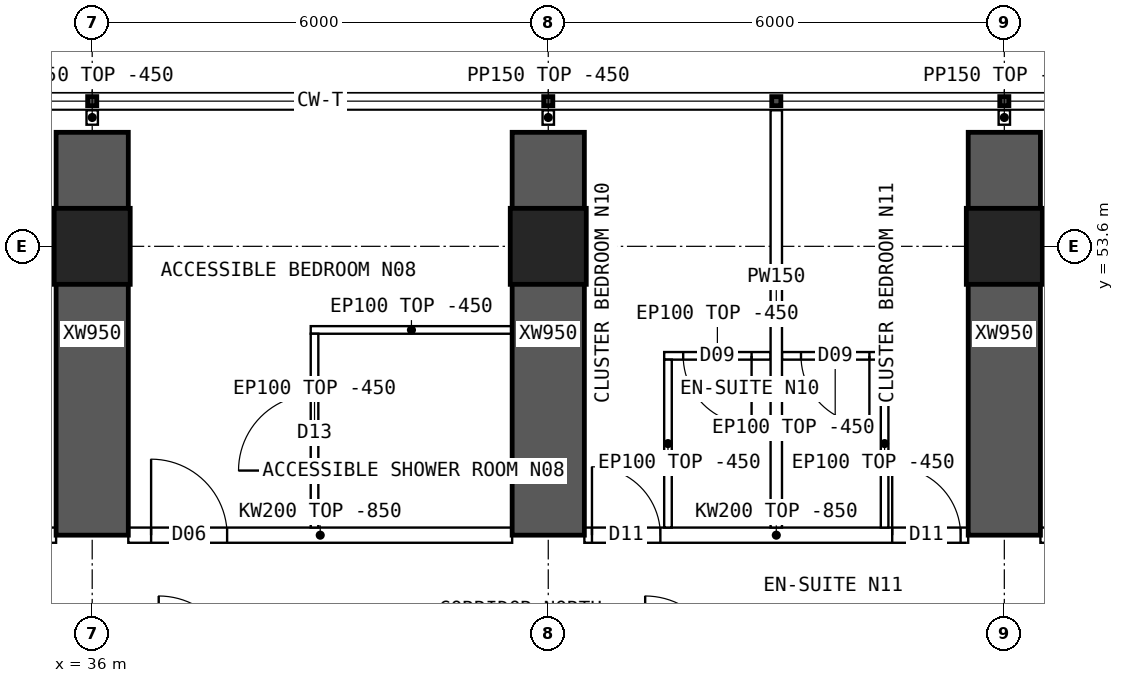
"""IFC4 building model, lengths in metres.
Left out: names, types, materials, properties, quantities, classifications, styles, units other than length and angle.
Written with IfcOpenShell. Run it as: python <this file> out.ifc"""

import sys

from ifc_helpers import new_model, si_unit, direction, frame, frame_2d, origin, origin_2d, place, context, subcontext, project, spatial, polyline, rectangle, hollow_rectangle, outline, extrude, element, fill, save


model = new_model("IFC4")
c1 = context("Model", 3, precision=1e-05, world=origin(), true_north=direction((0.0, 1.0)))
c2 = subcontext(c1, "Body", "Model", "MODEL_VIEW")
j1 = project(units=[si_unit("LENGTHUNIT", "METRE"), si_unit("PLANEANGLEUNIT", "RADIAN")], contexts=[c1])
p1 = place(None, origin())
s1 = spatial("IfcSite", under=j1, at=p1, CompositionType="ELEMENT")
p2 = place(p1, origin())
s2 = spatial("IfcBuilding", under=s1, at=p2, CompositionType="ELEMENT")
p3 = place(p2, frame((0.0, 0.0, 95.65)))
s3 = spatial("IfcBuildingStorey", under=s2, at=p3, CompositionType="ELEMENT", Elevation=95.65)
for number, where, z_axis, x_axis in (
    (1, (36.0, 53.6, 0.0), (0.0, 0.0, 1.0), (1.0, 0.0, 0.0)),
    (2, (42.0, 53.6, 0.0), (0.0, 0.0, 1.0), (1.0, 0.0, 0.0)),
    (3, (48.0, 53.6, 0.0), (0.0, 0.0, 1.0), (1.0, 0.0, 0.0)),
):
    element("IfcColumn", number, at=place(p3, frame(where, z_axis=z_axis, x_axis=x_axis)), inside=s3, PredefinedType="COLUMN", context=c2, shape_type="SweptSolid", body=[
        extrude(hollow_rectangle(XDim=1.0, YDim=1.0, WallThickness=0.1, at=origin_2d()), origin(), (0.0, 0.0, 1.0), 3.75),
    ])
for number, where, z_axis, x_axis in (
    (4, (36.0, 49.8, 0.0), (0.0, 0.0, 1.0), (0.0, 1.0, 0.0)),
    (5, (42.0, 49.8, 0.0), (0.0, 0.0, 1.0), (0.0, 1.0, 0.0)),
    (6, (48.0, 49.8, 0.0), (0.0, 0.0, 1.0), (0.0, 1.0, 0.0)),
):
    element("IfcWall", number, at=place(p3, frame(where, z_axis=z_axis, x_axis=x_axis)), inside=s3, PredefinedType="SHEAR", context=c2, shape_type="SweptSolid", body=[
        extrude(rectangle(XDim=5.3, YDim=0.95, at=frame_2d((2.65, 0.0))), origin(), (0.0, 0.0, 1.0), 3.75),
    ])
p4 = place(p3, frame((30.475, 49.8, 0.0), z_axis=(0.0, 0.0, 1.0), x_axis=(1.0, 0.0, 0.0)))
e7 = element("IfcWall", 7, at=p4, inside=s3, PredefinedType="SOLIDWALL", context=c2, shape_type="SweptSolid", body=[
    extrude(outline(polyline([(0.0, 0.0), (5.05, 0.0), (5.05, 2.9), (0.0, 2.9), (0.0, 0.0)])), frame((0.0, 0.1, 0.0), z_axis=(0.0, -1.0, 0.0), x_axis=(1.0, 0.0, 0.0)), (0.0, 0.0, 1.0), 0.2),
])
p5 = place(p4, frame((0.1, 0.0, 0.0)))
e8 = element("IfcOpeningElement", 8, at=p5, cuts=e7, PredefinedType="OPENING", context=c2, shape_type="SweptSolid", body=[
    extrude(rectangle(XDim=0.9, YDim=2.1, at=frame_2d((0.45, 1.05))), frame((0.0, 0.11, 0.0), z_axis=(0.0, -1.0, 0.0), x_axis=(1.0, 0.0, 0.0)), (0.0, 0.0, 1.0), 0.22),
])
p6 = place(p4, frame((4.05, 0.0, 0.0)))
e9 = element("IfcOpeningElement", 9, at=p6, cuts=e7, PredefinedType="OPENING", context=c2, shape_type="SweptSolid", body=[
    extrude(rectangle(XDim=0.9, YDim=2.1, at=frame_2d((0.45, 1.05))), frame((0.0, 0.11, 0.0), z_axis=(0.0, -1.0, 0.0), x_axis=(1.0, 0.0, 0.0)), (0.0, 0.0, 1.0), 0.22),
])
p7 = place(p3, frame((36.475, 49.8, 0.0), z_axis=(0.0, 0.0, 1.0), x_axis=(1.0, 0.0, 0.0)))
e10 = element("IfcWall", 10, at=p7, inside=s3, PredefinedType="SOLIDWALL", context=c2, shape_type="SweptSolid", body=[
    extrude(outline(polyline([(0.0, 0.0), (5.05, 0.0), (5.05, 2.9), (0.0, 2.9), (0.0, 0.0)])), frame((0.0, 0.1, 0.0), z_axis=(0.0, -1.0, 0.0), x_axis=(1.0, 0.0, 0.0)), (0.0, 0.0, 1.0), 0.2),
])
p8 = place(p7, frame((0.3, 0.0, 0.0)))
e11 = element("IfcOpeningElement", 11, at=p8, cuts=e10, PredefinedType="OPENING", context=c2, shape_type="SweptSolid", body=[
    extrude(rectangle(XDim=1.0, YDim=2.1, at=frame_2d((0.5, 1.05))), frame((0.0, 0.11, 0.0), z_axis=(0.0, -1.0, 0.0), x_axis=(1.0, 0.0, 0.0)), (0.0, 0.0, 1.0), 0.22),
])
p9 = place(p3, frame((42.475, 49.8, 0.0), z_axis=(0.0, 0.0, 1.0), x_axis=(1.0, 0.0, 0.0)))
e12 = element("IfcWall", 12, at=p9, inside=s3, PredefinedType="SOLIDWALL", context=c2, shape_type="SweptSolid", body=[
    extrude(outline(polyline([(0.0, 0.0), (5.05, 0.0), (5.05, 2.9), (0.0, 2.9), (0.0, 0.0)])), frame((0.0, 0.1, 0.0), z_axis=(0.0, -1.0, 0.0), x_axis=(1.0, 0.0, 0.0)), (0.0, 0.0, 1.0), 0.2),
])
p10 = place(p9, frame((0.1, 0.0, 0.0)))
e13 = element("IfcOpeningElement", 13, at=p10, cuts=e12, PredefinedType="OPENING", context=c2, shape_type="SweptSolid", body=[
    extrude(rectangle(XDim=0.9, YDim=2.1, at=frame_2d((0.45, 1.05))), frame((0.0, 0.11, 0.0), z_axis=(0.0, -1.0, 0.0), x_axis=(1.0, 0.0, 0.0)), (0.0, 0.0, 1.0), 0.22),
])
p11 = place(p9, frame((4.05, 0.0, 0.0)))
e14 = element("IfcOpeningElement", 14, at=p11, cuts=e12, PredefinedType="OPENING", context=c2, shape_type="SweptSolid", body=[
    extrude(rectangle(XDim=0.9, YDim=2.1, at=frame_2d((0.45, 1.05))), frame((0.0, 0.11, 0.0), z_axis=(0.0, -1.0, 0.0), x_axis=(1.0, 0.0, 0.0)), (0.0, 0.0, 1.0), 0.22),
])
p12 = place(p3, frame((48.475, 49.8, 0.0), z_axis=(0.0, 0.0, 1.0), x_axis=(1.0, 0.0, 0.0)))
e15 = element("IfcWall", 15, at=p12, inside=s3, PredefinedType="SOLIDWALL", context=c2, shape_type="SweptSolid", body=[
    extrude(outline(polyline([(0.0, 0.0), (5.05, 0.0), (5.05, 2.9), (0.0, 2.9), (0.0, 0.0)])), frame((0.0, 0.1, 0.0), z_axis=(0.0, -1.0, 0.0), x_axis=(1.0, 0.0, 0.0)), (0.0, 0.0, 1.0), 0.2),
])
p13 = place(p12, frame((0.6, 0.0, 0.0)))
e16 = element("IfcOpeningElement", 16, at=p13, cuts=e15, PredefinedType="OPENING", context=c2, shape_type="SweptSolid", body=[
    extrude(rectangle(XDim=1.0, YDim=2.1, at=frame_2d((0.5, 1.05))), frame((0.0, 0.11, 0.0), z_axis=(0.0, -1.0, 0.0), x_axis=(1.0, 0.0, 0.0)), (0.0, 0.0, 1.0), 0.22),
])
p14 = place(p3, frame((38.875, 52.5, 0.0), z_axis=(0.0, 0.0, 1.0), x_axis=(1.0, 0.0, 0.0)))
e17 = element("IfcWall", 17, at=p14, inside=s3, PredefinedType="PARTITIONING", context=c2, shape_type="SweptSolid", body=[
    extrude(rectangle(XDim=2.65, YDim=0.1, at=frame_2d((1.325, 0.0))), origin(), (0.0, 0.0, 1.0), 3.3),
])
p15 = place(p3, frame((38.925, 52.45, 0.0), z_axis=(0.0, 0.0, 1.0), x_axis=(0.0, -1.0, 0.0)))
e18 = element("IfcWall", 18, at=p15, inside=s3, PredefinedType="PARTITIONING", context=c2, shape_type="SweptSolid", body=[
    extrude(outline(polyline([(0.0, 0.0), (2.55, 0.0), (2.55, 2.9), (2.502, 2.9), (2.5, 3.3), (0.0, 3.3), (0.0, 0.0)])), frame((0.0, 0.05, 0.0), z_axis=(0.0, -1.0, 0.0), x_axis=(1.0, 0.0, 0.0)), (0.0, 0.0, 1.0), 0.1),
])
p16 = place(p15, frame((0.8, 0.0, 0.0)))
e19 = element("IfcOpeningElement", 19, at=p16, cuts=e18, PredefinedType="OPENING", context=c2, shape_type="SweptSolid", body=[
    extrude(rectangle(XDim=1.0, YDim=2.1, at=frame_2d((0.5, 1.05))), frame((0.0, 0.06, 0.0), z_axis=(0.0, -1.0, 0.0), x_axis=(1.0, 0.0, 0.0)), (0.0, 0.0, 1.0), 0.12),
])
p17 = place(p3, frame((45.0, 55.39, 0.0), z_axis=(0.0, 0.0, 1.0), x_axis=(0.0, -1.0, 0.0)))
e20 = element("IfcWall", 20, at=p17, inside=s3, PredefinedType="PARTITIONING", context=c2, shape_type="SweptSolid", body=[
    extrude(outline(polyline([(0.0, 0.0), (5.49, 0.0), (5.49, 2.9), (5.442, 2.9), (5.44, 3.3), (1.992, 3.3), (1.99, 2.9), (1.592, 2.9), (1.59, 3.3), (0.0, 3.3), (0.0, 0.0)])), frame((0.0, 0.075, 0.0), z_axis=(0.0, -1.0, 0.0), x_axis=(1.0, 0.0, 0.0)), (0.0, 0.0, 1.0), 0.15),
])
p18 = place(p3, frame((43.525, 52.159, 0.0), z_axis=(0.0, 0.0, 1.0), x_axis=(1.0, 0.0, 0.0)))
e21 = element("IfcWall", 21, at=p18, inside=s3, PredefinedType="PARTITIONING", context=c2, shape_type="SweptSolid", body=[
    extrude(rectangle(XDim=1.4, YDim=0.1, at=frame_2d((0.7, 0.0))), origin(), (0.0, 0.0, 1.0), 3.3),
])
p19 = place(p18, frame((0.25, 0.0, 0.0)))
e22 = element("IfcOpeningElement", 22, at=p19, cuts=e21, PredefinedType="OPENING", context=c2, shape_type="SweptSolid", body=[
    extrude(rectangle(XDim=0.9, YDim=2.1, at=frame_2d((0.45, 1.05))), frame((0.0, 0.06, 0.0), z_axis=(0.0, -1.0, 0.0), x_axis=(1.0, 0.0, 0.0)), (0.0, 0.0, 1.0), 0.12),
])
p20 = place(p3, frame((43.575, 52.109, 0.0), z_axis=(0.0, 0.0, 1.0), x_axis=(0.0, -1.0, 0.0)))
e23 = element("IfcWall", 23, at=p20, inside=s3, PredefinedType="PARTITIONING", context=c2, shape_type="SweptSolid", body=[
    extrude(outline(polyline([(0.0, 0.0), (2.209, 0.0), (2.209, 2.9), (2.161, 2.9), (2.159, 3.3), (0.0, 3.3), (0.0, 0.0)])), frame((0.0, 0.05, 0.0), z_axis=(0.0, -1.0, 0.0), x_axis=(1.0, 0.0, 0.0)), (0.0, 0.0, 1.0), 0.1),
])
p21 = place(p3, frame((45.075, 52.159, 0.0), z_axis=(0.0, 0.0, 1.0), x_axis=(1.0, 0.0, 0.0)))
e24 = element("IfcWall", 24, at=p21, inside=s3, PredefinedType="PARTITIONING", context=c2, shape_type="SweptSolid", body=[
    extrude(rectangle(XDim=1.4, YDim=0.1, at=frame_2d((0.7, 0.0))), origin(), (0.0, 0.0, 1.0), 3.3),
])
p22 = place(p21, frame((0.25, 0.0, 0.0)))
e25 = element("IfcOpeningElement", 25, at=p22, cuts=e24, PredefinedType="OPENING", context=c2, shape_type="SweptSolid", body=[
    extrude(rectangle(XDim=0.9, YDim=2.1, at=frame_2d((0.45, 1.05))), frame((0.0, 0.06, 0.0), z_axis=(0.0, -1.0, 0.0), x_axis=(1.0, 0.0, 0.0)), (0.0, 0.0, 1.0), 0.12),
])
p23 = place(p3, frame((46.425, 52.109, 0.0), z_axis=(0.0, 0.0, 1.0), x_axis=(0.0, -1.0, 0.0)))
e26 = element("IfcWall", 26, at=p23, inside=s3, PredefinedType="PARTITIONING", context=c2, shape_type="SweptSolid", body=[
    extrude(outline(polyline([(0.0, 0.0), (2.209, 0.0), (2.209, 2.9), (2.161, 2.9), (2.159, 3.3), (0.0, 3.3), (0.0, 0.0)])), frame((0.0, 0.05, 0.0), z_axis=(0.0, -1.0, 0.0), x_axis=(1.0, 0.0, 0.0)), (0.0, 0.0, 1.0), 0.1),
])
for number, where, z_axis, x_axis in (
    (27, (36.0, 55.2, 0.0), (0.0, 0.0, 1.0), (0.0, 1.0, 0.0)),
    (28, (42.0, 55.2, 0.0), (0.0, 0.0, 1.0), (0.0, 1.0, 0.0)),
    (29, (48.0, 55.2, 0.0), (0.0, 0.0, 1.0), (0.0, 1.0, 0.0)),
):
    element("IfcWall", number, at=place(p3, frame(where, z_axis=z_axis, x_axis=x_axis)), inside=s3, PredefinedType="PARTITIONING", context=c2, shape_type="SweptSolid", body=[
        extrude(rectangle(XDim=0.19, YDim=0.15, at=frame_2d((0.095, 0.0))), origin(), (0.0, 0.0, 1.0), 3.3),
    ])
p24 = place(p16, origin())
e30 = element("IfcDoor", 30, at=p24, inside=s3, OperationType="SINGLE_SWING_RIGHT", PredefinedType="DOOR", context=c2, shape_type="SweptSolid", body=[
    extrude(rectangle(XDim=1.0, YDim=2.1, at=frame_2d((0.5, 1.05))), frame((0.0, 0.025, 0.0), z_axis=(0.0, -1.0, 0.0), x_axis=(1.0, 0.0, 0.0)), (0.0, 0.0, 1.0), 0.05),
])
fill(e19, e30)
p25 = place(p8, origin())
e31 = element("IfcDoor", 31, at=p25, inside=s3, OperationType="SINGLE_SWING_LEFT", PredefinedType="DOOR", context=c2, shape_type="SweptSolid", body=[
    extrude(rectangle(XDim=1.0, YDim=2.1, at=frame_2d((0.5, 1.05))), frame((0.0, 0.025, 0.0), z_axis=(0.0, -1.0, 0.0), x_axis=(1.0, 0.0, 0.0)), (0.0, 0.0, 1.0), 0.05),
])
fill(e11, e31)
p26 = place(p19, origin())
e32 = element("IfcDoor", 32, at=p26, inside=s3, OperationType="SINGLE_SWING_RIGHT", PredefinedType="DOOR", context=c2, shape_type="SweptSolid", body=[
    extrude(rectangle(XDim=0.9, YDim=2.1, at=frame_2d((0.45, 1.05))), frame((0.0, 0.025, 0.0), z_axis=(0.0, -1.0, 0.0), x_axis=(1.0, 0.0, 0.0)), (0.0, 0.0, 1.0), 0.05),
])
fill(e22, e32)
p27 = place(p10, origin())
e33 = element("IfcDoor", 33, at=p27, inside=s3, OperationType="SINGLE_SWING_LEFT", PredefinedType="DOOR", context=c2, shape_type="SweptSolid", body=[
    extrude(rectangle(XDim=0.9, YDim=2.1, at=frame_2d((0.45, 1.05))), frame((0.0, 0.025, 0.0), z_axis=(0.0, -1.0, 0.0), x_axis=(1.0, 0.0, 0.0)), (0.0, 0.0, 1.0), 0.05),
])
fill(e13, e33)
p28 = place(p22, origin())
e34 = element("IfcDoor", 34, at=p28, inside=s3, OperationType="SINGLE_SWING_RIGHT", PredefinedType="DOOR", context=c2, shape_type="SweptSolid", body=[
    extrude(rectangle(XDim=0.9, YDim=2.1, at=frame_2d((0.45, 1.05))), frame((0.0, 0.025, 0.0), z_axis=(0.0, -1.0, 0.0), x_axis=(1.0, 0.0, 0.0)), (0.0, 0.0, 1.0), 0.05),
])
fill(e25, e34)
p29 = place(p11, origin())
e35 = element("IfcDoor", 35, at=p29, inside=s3, OperationType="SINGLE_SWING_LEFT", PredefinedType="DOOR", context=c2, shape_type="SweptSolid", body=[
    extrude(rectangle(XDim=0.9, YDim=2.1, at=frame_2d((0.45, 1.05))), frame((0.0, 0.025, 0.0), z_axis=(0.0, -1.0, 0.0), x_axis=(1.0, 0.0, 0.0)), (0.0, 0.0, 1.0), 0.05),
])
fill(e14, e35)
save(model, sys.argv[1])
